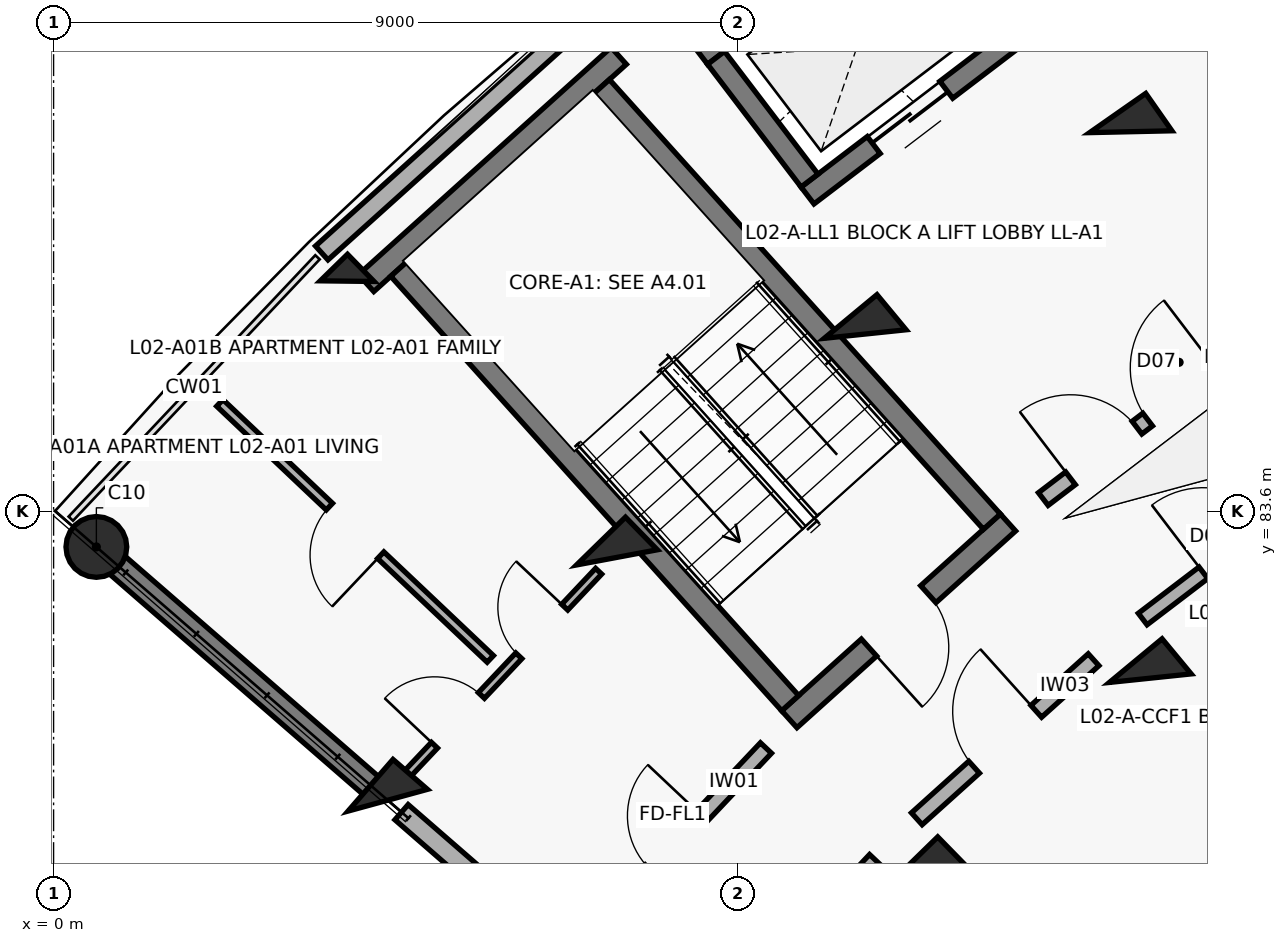
"""IFC4 building model, lengths in metres.
Left out: names, types, materials, properties, quantities, classifications, styles, units other than length and angle.
Written with IfcOpenShell. Run it as: python <this file> out.ifc"""

import sys

from ifc_helpers import new_model, si_unit, direction, frame, frame_2d, origin, origin_2d, place, context, subcontext, project, spatial, rectangle, circle, extrude, element, fill, save


model = new_model("IFC4")
c1 = context("Model", 3, precision=1e-05, world=origin(), true_north=direction((0.0, 1.0)))
c2 = subcontext(c1, "Body", "Model", "MODEL_VIEW")
j1 = project(units=[si_unit("LENGTHUNIT", "METRE"), si_unit("PLANEANGLEUNIT", "RADIAN")], contexts=[c1])
p1 = place(None, origin())
s1 = spatial("IfcSite", under=j1, at=p1, CompositionType="ELEMENT")
p2 = place(p1, origin())
s2 = spatial("IfcBuilding", under=s1, at=p2, CompositionType="ELEMENT")
p3 = place(p2, frame((0.0, 0.0, 8.1)))
s3 = spatial("IfcBuildingStorey", under=s2, at=p3, CompositionType="ELEMENT", Elevation=8.1)
p4 = place(p3, frame((4.397, 79.796, 0.0), z_axis=(0.0, 0.0, 1.0), x_axis=(-0.754709580223, 0.656059028991, 0.0)))
e1 = element("IfcColumn", 1, at=p4, inside=s3, PredefinedType="COLUMN", context=c2, shape_type="SweptSolid", body=[
    extrude(rectangle(XDim=0.6, YDim=0.9, at=origin_2d()), origin(), (0.0, 0.0, 1.0), 3.1),
])
p5 = place(p3, frame((0.563, 83.129, 0.0), z_axis=(0.0, 0.0, 1.0), x_axis=(-0.754709580223, 0.656059028991, 0.0)))
e2 = element("IfcColumn", 2, at=p5, inside=s3, PredefinedType="COLUMN", context=c2, shape_type="SweptSolid", body=[
    extrude(circle(Radius=0.4, at=origin_2d()), origin(), (0.0, 0.0, 1.0), 3.1),
])
for number, where, z_axis, x_axis in (
    (3, (11.52, 78.784, 0.0), (0.0, 0.0, 1.0), (-0.699, 0.715, 0.0)),
    (4, (7.412, 82.991, 0.0), (0.0, 0.0, 1.0), (-0.699, 0.715, 0.0)),
):
    element("IfcColumn", number, at=place(p3, frame(where, z_axis=z_axis, x_axis=x_axis)), inside=s3, PredefinedType="COLUMN", context=c2, shape_type="SweptSolid", body=[
        extrude(rectangle(XDim=0.6, YDim=0.9, at=origin_2d()), origin(), (0.0, 0.0, 1.0), 3.1),
    ])
p6 = place(p3, frame((3.863, 86.626, 0.0), z_axis=(0.0, 0.0, 1.0), x_axis=(-0.698665066769, 0.715448897181, 0.0)))
e5 = element("IfcColumn", 5, at=p6, inside=s3, PredefinedType="COLUMN", context=c2, shape_type="SweptSolid", body=[
    extrude(rectangle(XDim=0.5, YDim=0.5, at=origin_2d()), origin(), (0.0, 0.0, 1.0), 3.1),
])
for number, where, z_axis, x_axis in (
    (6, (14.429, 81.402, 0.0), (0.0, 0.0, 1.0), (-0.638, 0.77, 0.0)),
    (7, (10.678, 85.93, 0.0), (0.0, 0.0, 1.0), (-0.638, 0.77, 0.0)),
):
    element("IfcColumn", number, at=place(p3, frame(where, z_axis=z_axis, x_axis=x_axis)), inside=s3, PredefinedType="COLUMN", context=c2, shape_type="SweptSolid", body=[
        extrude(rectangle(XDim=0.6, YDim=0.9, at=origin_2d()), origin(), (0.0, 0.0, 1.0), 3.1),
    ])
p7 = place(p3, frame((7.437, 89.842, 0.0), z_axis=(0.0, 0.0, 1.0), x_axis=(-0.637961754089, 0.770068049148, 0.0)))
e8 = element("IfcColumn", 8, at=p7, inside=s3, PredefinedType="COLUMN", context=c2, shape_type="SweptSolid", body=[
    extrude(rectangle(XDim=0.55, YDim=0.8, at=origin_2d()), origin(), (0.0, 0.0, 1.0), 3.1),
])
p8 = place(p3, frame((14.172, 88.592, 0.0), z_axis=(0.0, 0.0, 1.0), x_axis=(-0.573004420611, 0.819552276527, 0.0)))
e9 = element("IfcColumn", 9, at=p8, inside=s3, PredefinedType="COLUMN", context=c2, shape_type="SweptSolid", body=[
    extrude(rectangle(XDim=0.6, YDim=0.9, at=origin_2d()), origin(), (0.0, 0.0, 1.0), 3.1),
])
p9 = place(p3, frame((4.261, 79.914, 0.0), z_axis=(0.0, 0.0, 1.0), x_axis=(-0.754703505217, 0.65606601742, 0.0)))
e10 = element("IfcWall", 10, at=p9, inside=s3, PredefinedType="SHEAR", context=c2, shape_type="SweptSolid", body=[
    extrude(rectangle(XDim=4.72, YDim=0.31, at=frame_2d((2.36, 0.0))), origin(), (0.0, 0.0, 1.0), 2.86),
])
p10 = place(p3, frame((3.528, 86.997, 0.0), z_axis=(0.0, 0.0, 1.0), x_axis=(0.743387539862, 0.668860946369, 0.0)))
e11 = element("IfcWall", 11, at=p10, inside=s3, PredefinedType="SOLIDWALL", context=c2, shape_type="SweptSolid", body=[
    extrude(rectangle(XDim=4.809, YDim=0.245, at=frame_2d((2.405, 0.0))), origin(), (0.0, 0.0, 1.0), 2.25),
])
p11 = place(p3, frame((10.766, 74.259, 0.0), z_axis=(0.0, 0.0, 1.0), x_axis=(-0.754717680958, 0.656049710044, 0.0)))
e12 = element("IfcWall", 12, at=p11, inside=s3, PredefinedType="SOLIDWALL", context=c2, shape_type="SweptSolid", body=[
    extrude(rectangle(XDim=8.2, YDim=0.265, at=frame_2d((4.1, 0.0))), origin(), (0.0, 0.0, 1.0), 2.08),
])
p12 = place(p11, frame((3.59, 0.0, 0.75)))
e13 = element("IfcOpeningElement", 13, at=p12, cuts=e12, PredefinedType="OPENING", context=c2, shape_type="SweptSolid", body=[
    extrude(rectangle(XDim=1.35, YDim=1.35, at=frame_2d((0.675, 0.675))), frame((0.0, 0.142, 0.0), z_axis=(0.0, -1.0, 0.0), x_axis=(1.0, 0.0, 0.0)), (0.0, 0.0, 1.0), 0.285),
])
p13 = place(p3, frame((12.557, 83.45, 0.0), z_axis=(0.0, 0.0, 1.0), x_axis=(-0.743375696158, -0.668874109501, 0.0)))
e14 = element("IfcWall", 14, at=p13, inside=s3, PredefinedType="SHEAR", context=c2, shape_type="SweptSolid", body=[
    extrude(rectangle(XDim=3.87, YDim=0.3, at=frame_2d((1.935, 0.0))), origin(), (0.0, 0.0, 1.0), 3.1),
])
p14 = place(p13, frame((1.41, 0.0, 0.0)))
e15 = element("IfcOpeningElement", 15, at=p14, cuts=e14, PredefinedType="OPENING", context=c2, shape_type="SweptSolid", body=[
    extrude(rectangle(XDim=1.05, YDim=2.15, at=frame_2d((0.525, 1.075))), frame((0.0, 0.16, 0.0), z_axis=(0.0, -1.0, 0.0), x_axis=(1.0, 0.0, 0.0)), (0.0, 0.0, 1.0), 0.32),
])
p15 = place(p3, frame((7.436, 89.59, 0.0), z_axis=(0.0, 0.0, 1.0), x_axis=(-0.743400052815, -0.668847038922, 0.0)))
e16 = element("IfcWall", 16, at=p15, inside=s3, PredefinedType="SHEAR", context=c2, shape_type="SweptSolid", body=[
    extrude(rectangle(XDim=4.47, YDim=0.3, at=frame_2d((2.235, 0.0))), origin(), (0.0, 0.0, 1.0), 3.1),
])
p16 = place(p3, frame((12.345, 83.461, 0.0), z_axis=(0.0, 0.0, 1.0), x_axis=(-0.668868253964, 0.743380964808, 0.0)))
e17 = element("IfcWall", 17, at=p16, inside=s3, PredefinedType="SHEAR", context=c2, shape_type="SweptSolid", body=[
    extrude(rectangle(XDim=7.69, YDim=0.3, at=frame_2d((3.845, 0.0))), origin(), (0.0, 0.0, 1.0), 3.1),
])
p17 = place(p3, frame((9.691, 81.073, 0.0), z_axis=(0.0, 0.0, 1.0), x_axis=(-0.668885797871, 0.743365179038, 0.0)))
e18 = element("IfcWall", 18, at=p17, inside=s3, PredefinedType="SHEAR", context=c2, shape_type="SweptSolid", body=[
    extrude(rectangle(XDim=7.69, YDim=0.3, at=frame_2d((3.845, 0.0))), origin(), (0.0, 0.0, 1.0), 3.1),
])
p18 = place(p3, frame((12.616, 89.807, 0.0), z_axis=(0.0, 0.0, 1.0), x_axis=(-0.795474703455, -0.605986795371, 0.0)))
e19 = element("IfcWall", 19, at=p18, inside=s3, PredefinedType="SHEAR", context=c2, shape_type="SweptSolid", body=[
    extrude(rectangle(XDim=3.39, YDim=0.28, at=frame_2d((1.695, 0.0))), origin(), (0.0, 0.0, 1.0), 3.1),
])
p19 = place(p18, frame((1.095, 0.0, 0.0)))
e20 = element("IfcOpeningElement", 20, at=p19, cuts=e19, PredefinedType="OPENING", context=c2, shape_type="SweptSolid", body=[
    extrude(rectangle(XDim=1.2, YDim=2.15, at=frame_2d((0.6, 1.075))), frame((0.0, 0.15, 0.0), z_axis=(0.0, -1.0, 0.0), x_axis=(1.0, 0.0, 0.0)), (0.0, 0.0, 1.0), 0.3),
])
p20 = place(p3, frame((11.216, 91.645, 0.0), z_axis=(0.0, 0.0, 1.0), x_axis=(-0.795439986025, -0.606032365994, 0.0)))
e21 = element("IfcWall", 21, at=p20, inside=s3, PredefinedType="SHEAR", context=c2, shape_type="SweptSolid", body=[
    extrude(rectangle(XDim=3.39, YDim=0.28, at=frame_2d((1.695, 0.0))), origin(), (0.0, 0.0, 1.0), 3.1),
])
p21 = place(p3, frame((9.946, 87.949, 0.0), z_axis=(0.0, 0.0, 1.0), x_axis=(-0.605891019062, 0.795547656033, 0.0)))
e22 = element("IfcWall", 22, at=p21, inside=s3, PredefinedType="SHEAR", context=c2, shape_type="SweptSolid", body=[
    extrude(rectangle(XDim=2.03, YDim=0.28, at=frame_2d((1.015, 0.0))), origin(), (0.0, 0.0, 1.0), 3.1),
])
p22 = place(p3, frame((7.014, 77.984, 0.0), z_axis=(0.0, 0.0, 1.0), x_axis=(0.686310507227, 0.727308660522, 0.0)))
e23 = element("IfcWall", 23, at=p22, inside=s3, PredefinedType="SOLIDWALL", context=c2, shape_type="SweptSolid", body=[
    extrude(rectangle(XDim=3.436, YDim=0.2, at=frame_2d((1.718, 0.0))), origin(), (0.0, 0.0, 1.0), 2.08),
])
p23 = place(p22, frame((1.228, 0.0, 0.0)))
e24 = element("IfcOpeningElement", 24, at=p23, cuts=e23, PredefinedType="OPENING", context=c2, shape_type="SweptSolid", body=[
    extrude(rectangle(XDim=0.98, YDim=2.15, at=frame_2d((0.49, 1.075))), frame((0.0, 0.11, 0.0), z_axis=(0.0, -1.0, 0.0), x_axis=(1.0, 0.0, 0.0)), (0.0, 0.0, 1.0), 0.22),
])
p24 = place(p3, frame((8.561, 76.639, 0.0), z_axis=(0.0, 0.0, 1.0), x_axis=(0.686307658735, 0.727311348434, 0.0)))
e25 = element("IfcWall", 25, at=p24, inside=s3, PredefinedType="SOLIDWALL", context=c2, shape_type="SweptSolid", body=[
    extrude(rectangle(XDim=3.269, YDim=0.19, at=frame_2d((1.634, 0.0))), origin(), (0.0, 0.0, 1.0), 2.08),
])
p25 = place(p24, frame((1.164, 0.0, 0.0)))
e26 = element("IfcOpeningElement", 26, at=p25, cuts=e25, PredefinedType="OPENING", context=c2, shape_type="SweptSolid", body=[
    extrude(rectangle(XDim=0.94, YDim=2.1, at=frame_2d((0.47, 1.05))), frame((0.0, 0.105, 0.0), z_axis=(0.0, -1.0, 0.0), x_axis=(1.0, 0.0, 0.0)), (0.0, 0.0, 1.0), 0.21),
])
p26 = place(p3, frame((4.565, 80.047, 0.0), z_axis=(0.0, 0.0, 1.0), x_axis=(0.686300649561, 0.727317962388, 0.0)))
e27 = element("IfcWall", 27, at=p26, inside=s3, PredefinedType="PARTITIONING", context=c2, shape_type="SweptSolid", body=[
    extrude(rectangle(XDim=3.797, YDim=0.11, at=frame_2d((1.899, 0.0))), origin(), (0.0, 0.0, 1.0), 2.08),
])
p27 = place(p26, frame((0.65, 0.0, 0.0)))
e28 = element("IfcOpeningElement", 28, at=p27, cuts=e27, PredefinedType="OPENING", context=c2, shape_type="SweptSolid", body=[
    extrude(rectangle(XDim=0.9, YDim=2.1, at=frame_2d((0.45, 1.05))), frame((0.0, 0.065, 0.0), z_axis=(0.0, -1.0, 0.0), x_axis=(1.0, 0.0, 0.0)), (0.0, 0.0, 1.0), 0.13),
])
p28 = place(p26, frame((2.267, 0.0, 0.0)))
e29 = element("IfcOpeningElement", 29, at=p28, cuts=e27, PredefinedType="OPENING", context=c2, shape_type="SweptSolid", body=[
    extrude(rectangle(XDim=0.88, YDim=2.1, at=frame_2d((0.44, 1.05))), frame((0.0, 0.065, 0.0), z_axis=(0.0, -1.0, 0.0), x_axis=(1.0, 0.0, 0.0)), (0.0, 0.0, 1.0), 0.13),
])
p29 = place(p3, frame((5.746, 81.655, 0.0), z_axis=(0.0, 0.0, 1.0), x_axis=(-0.726295620759, 0.687382478149, 0.0)))
e30 = element("IfcWall", 30, at=p29, inside=s3, PredefinedType="PARTITIONING", context=c2, shape_type="SweptSolid", body=[
    extrude(rectangle(XDim=4.9, YDim=0.12, at=frame_2d((2.45, 0.0))), origin(), (0.0, 0.0, 1.0), 2.08),
])
p30 = place(p29, frame((1.985, 0.0, 0.0)))
e31 = element("IfcOpeningElement", 31, at=p30, cuts=e30, PredefinedType="OPENING", context=c2, shape_type="SweptSolid", body=[
    extrude(rectangle(XDim=0.93, YDim=2.1, at=frame_2d((0.465, 1.05))), frame((0.0, 0.07, 0.0), z_axis=(0.0, -1.0, 0.0), x_axis=(1.0, 0.0, 0.0)), (0.0, 0.0, 1.0), 0.14),
])
p31 = place(p3, frame((11.357, 79.552, 0.0), z_axis=(0.0, 0.0, 1.0), x_axis=(0.743387266925, 0.668861249718, 0.0)))
e32 = element("IfcWall", 32, at=p31, inside=s3, PredefinedType="SOLIDWALL", context=c2, shape_type="SweptSolid", body=[
    extrude(rectangle(XDim=3.128, YDim=0.21, at=frame_2d((1.564, 0.0))), origin(), (0.0, 0.0, 1.0), 2.08),
])
p32 = place(p31, frame((1.014, 0.0, 0.0)))
e33 = element("IfcOpeningElement", 33, at=p32, cuts=e32, PredefinedType="OPENING", context=c2, shape_type="SweptSolid", body=[
    extrude(rectangle(XDim=1.1, YDim=2.15, at=frame_2d((0.55, 1.075))), frame((0.0, 0.115, 0.0), z_axis=(0.0, -1.0, 0.0), x_axis=(1.0, 0.0, 0.0)), (0.0, 0.0, 1.0), 0.23),
])
p33 = place(p3, frame((13.021, 83.759, 0.0), z_axis=(0.0, 0.0, 1.0), x_axis=(0.795498026433, 0.605956178235, 0.0)))
e34 = element("IfcWall", 34, at=p33, inside=s3, PredefinedType="SOLIDWALL", context=c2, shape_type="SweptSolid", body=[
    extrude(rectangle(XDim=3.296, YDim=0.21, at=frame_2d((1.648, 0.0))), origin(), (0.0, 0.0, 1.0), 2.08),
])
p34 = place(p33, frame((0.45, 0.0, 0.0)))
e35 = element("IfcOpeningElement", 35, at=p34, cuts=e34, PredefinedType="OPENING", context=c2, shape_type="SweptSolid", body=[
    extrude(rectangle(XDim=1.1, YDim=2.15, at=frame_2d((0.55, 1.075))), frame((0.0, 0.115, 0.0), z_axis=(0.0, -1.0, 0.0), x_axis=(1.0, 0.0, 0.0)), (0.0, 0.0, 1.0), 0.23),
])
p35 = place(p33, frame((1.726, 0.0, 0.0)))
e36 = element("IfcOpeningElement", 36, at=p35, cuts=e34, PredefinedType="OPENING", context=c2, shape_type="SweptSolid", body=[
    extrude(rectangle(XDim=1.12, YDim=2.15, at=frame_2d((0.56, 1.075))), frame((0.0, 0.115, 0.0), z_axis=(0.0, -1.0, 0.0), x_axis=(1.0, 0.0, 0.0)), (0.0, 0.0, 1.0), 0.23),
])
p36 = place(p3, frame((14.329, 82.18, 0.0), z_axis=(0.0, 0.0, 1.0), x_axis=(0.795501577908, 0.605951515838, 0.0)))
e37 = element("IfcWall", 37, at=p36, inside=s3, PredefinedType="SOLIDWALL", context=c2, shape_type="SweptSolid", body=[
    extrude(rectangle(XDim=3.129, YDim=0.19, at=frame_2d((1.564, 0.0))), origin(), (0.0, 0.0, 1.0), 2.08),
])
p37 = place(p36, frame((1.004, 0.0, 0.0)))
e38 = element("IfcOpeningElement", 38, at=p37, cuts=e37, PredefinedType="OPENING", context=c2, shape_type="SweptSolid", body=[
    extrude(rectangle(XDim=1.12, YDim=2.15, at=frame_2d((0.56, 1.075))), frame((0.0, 0.105, 0.0), z_axis=(0.0, -1.0, 0.0), x_axis=(1.0, 0.0, 0.0)), (0.0, 0.0, 1.0), 0.21),
])
p38 = place(p3, frame((17.524, 87.288, 0.0), z_axis=(0.0, 0.0, 1.0), x_axis=(-0.540338452216, 0.841447774408, 0.0)))
e39 = element("IfcWall", 39, at=p38, inside=s3, PredefinedType="PARTITIONING", context=c2, shape_type="SweptSolid", body=[
    extrude(rectangle(XDim=7.95, YDim=0.14, at=frame_2d((3.975, 0.0))), origin(), (0.0, 0.0, 1.0), 2.08),
])
p39 = place(p38, frame((6.05, 0.0, 0.0)))
e40 = element("IfcOpeningElement", 40, at=p39, cuts=e39, PredefinedType="OPENING", context=c2, shape_type="SweptSolid", body=[
    extrude(rectangle(XDim=0.92, YDim=2.1, at=frame_2d((0.46, 1.05))), frame((0.0, 0.08, 0.0), z_axis=(0.0, -1.0, 0.0), x_axis=(1.0, 0.0, 0.0)), (0.0, 0.0, 1.0), 0.16),
])
p40 = place(p14, origin())
e41 = element("IfcDoor", 41, at=p40, inside=s3, OperationType="SINGLE_SWING_RIGHT", PredefinedType="DOOR", context=c2, shape_type="SweptSolid", body=[
    extrude(rectangle(XDim=1.05, YDim=2.15, at=frame_2d((0.525, 1.075))), frame((0.0, 0.025, 0.0), z_axis=(0.0, -1.0, 0.0), x_axis=(1.0, 0.0, 0.0)), (0.0, 0.0, 1.0), 0.05),
])
fill(e15, e41)
p41 = place(p19, origin())
e42 = element("IfcDoor", 42, at=p41, inside=s3, OperationType="DOUBLE_DOOR_SLIDING", PredefinedType="DOOR", context=c2, shape_type="SweptSolid", body=[
    extrude(rectangle(XDim=1.2, YDim=2.15, at=frame_2d((0.6, 1.075))), frame((0.0, 0.025, 0.0), z_axis=(0.0, -1.0, 0.0), x_axis=(1.0, 0.0, 0.0)), (0.0, 0.0, 1.0), 0.05),
])
fill(e20, e42)
p42 = place(p23, origin())
e43 = element("IfcDoor", 43, at=p42, inside=s3, OperationType="SINGLE_SWING_RIGHT", PredefinedType="DOOR", context=c2, shape_type="SweptSolid", body=[
    extrude(rectangle(XDim=0.98, YDim=2.15, at=frame_2d((0.49, 1.075))), frame((0.0, 0.025, 0.0), z_axis=(0.0, -1.0, 0.0), x_axis=(1.0, 0.0, 0.0)), (0.0, 0.0, 1.0), 0.05),
])
fill(e24, e43)
p43 = place(p27, origin())
e44 = element("IfcDoor", 44, at=p43, inside=s3, OperationType="SINGLE_SWING_LEFT", PredefinedType="DOOR", context=c2, shape_type="SweptSolid", body=[
    extrude(rectangle(XDim=0.9, YDim=2.1, at=frame_2d((0.45, 1.05))), frame((0.0, 0.025, 0.0), z_axis=(0.0, -1.0, 0.0), x_axis=(1.0, 0.0, 0.0)), (0.0, 0.0, 1.0), 0.05),
])
fill(e28, e44)
p44 = place(p28, origin())
e45 = element("IfcDoor", 45, at=p44, inside=s3, OperationType="SINGLE_SWING_RIGHT", PredefinedType="DOOR", context=c2, shape_type="SweptSolid", body=[
    extrude(rectangle(XDim=0.88, YDim=2.1, at=frame_2d((0.44, 1.05))), frame((0.0, 0.025, 0.0), z_axis=(0.0, -1.0, 0.0), x_axis=(1.0, 0.0, 0.0)), (0.0, 0.0, 1.0), 0.05),
])
fill(e29, e45)
p45 = place(p30, origin())
e46 = element("IfcDoor", 46, at=p45, inside=s3, OperationType="SINGLE_SWING_LEFT", PredefinedType="DOOR", context=c2, shape_type="SweptSolid", body=[
    extrude(rectangle(XDim=0.93, YDim=2.1, at=frame_2d((0.465, 1.05))), frame((0.0, 0.025, 0.0), z_axis=(0.0, -1.0, 0.0), x_axis=(1.0, 0.0, 0.0)), (0.0, 0.0, 1.0), 0.05),
])
fill(e31, e46)
p46 = place(p32, origin())
e47 = element("IfcDoor", 47, at=p46, inside=s3, OperationType="SINGLE_SWING_RIGHT", PredefinedType="DOOR", context=c2, shape_type="SweptSolid", body=[
    extrude(rectangle(XDim=1.1, YDim=2.15, at=frame_2d((0.55, 1.075))), frame((0.0, 0.025, 0.0), z_axis=(0.0, -1.0, 0.0), x_axis=(1.0, 0.0, 0.0)), (0.0, 0.0, 1.0), 0.05),
])
fill(e33, e47)
p47 = place(p34, origin())
e48 = element("IfcDoor", 48, at=p47, inside=s3, OperationType="SINGLE_SWING_LEFT", PredefinedType="DOOR", context=c2, shape_type="SweptSolid", body=[
    extrude(rectangle(XDim=1.1, YDim=2.15, at=frame_2d((0.55, 1.075))), frame((0.0, 0.025, 0.0), z_axis=(0.0, -1.0, 0.0), x_axis=(1.0, 0.0, 0.0)), (0.0, 0.0, 1.0), 0.05),
])
fill(e35, e48)
p48 = place(p35, origin())
e49 = element("IfcDoor", 49, at=p48, inside=s3, OperationType="SINGLE_SWING_RIGHT", PredefinedType="DOOR", context=c2, shape_type="SweptSolid", body=[
    extrude(rectangle(XDim=1.12, YDim=2.15, at=frame_2d((0.56, 1.075))), frame((0.0, 0.025, 0.0), z_axis=(0.0, -1.0, 0.0), x_axis=(1.0, 0.0, 0.0)), (0.0, 0.0, 1.0), 0.05),
])
fill(e36, e49)
p49 = place(p37, origin())
e50 = element("IfcDoor", 50, at=p49, inside=s3, OperationType="SINGLE_SWING_LEFT", PredefinedType="DOOR", context=c2, shape_type="SweptSolid", body=[
    extrude(rectangle(XDim=1.12, YDim=2.15, at=frame_2d((0.56, 1.075))), frame((0.0, 0.025, 0.0), z_axis=(0.0, -1.0, 0.0), x_axis=(1.0, 0.0, 0.0)), (0.0, 0.0, 1.0), 0.05),
])
fill(e38, e50)
save(model, sys.argv[1])
